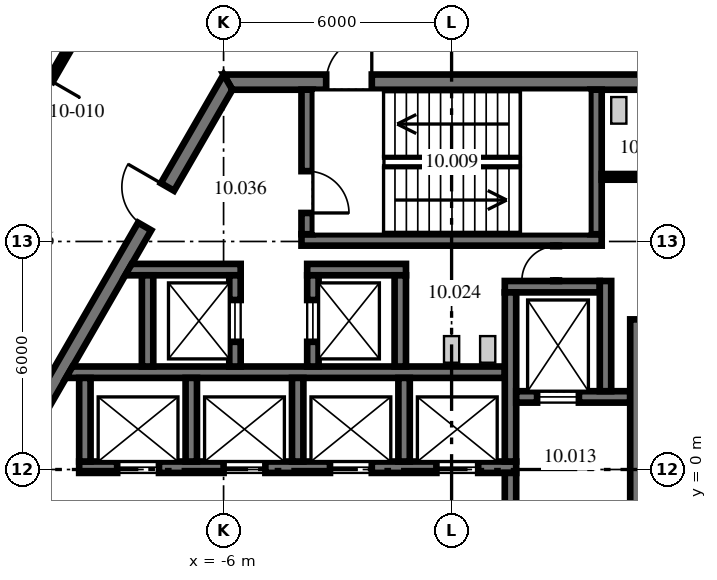
"""IFC4 building model, lengths in metres.
Left out: names, types, materials, properties, quantities, classifications, styles, units other than length and angle.
Written with IfcOpenShell. Run it as: python <this file> out.ifc"""

import sys

from ifc_helpers import new_model, si_unit, direction, frame, frame_2d, origin, place, context, subcontext, project, spatial, polyline, rectangle, outline, extrude, source, transform, mapped, element, fill, save


model = new_model("IFC4")
c1 = context("Model", 3, precision=1e-05, world=origin(), true_north=direction((0.0, 1.0)))
c2 = subcontext(c1, "Body", "Model", "MODEL_VIEW")
j1 = project(units=[si_unit("LENGTHUNIT", "METRE"), si_unit("PLANEANGLEUNIT", "RADIAN")], contexts=[c1])
p1 = place(None, origin())
s1 = spatial("IfcSite", under=j1, at=p1, CompositionType="ELEMENT")
p2 = place(p1, origin())
s2 = spatial("IfcBuilding", under=s1, at=p2, CompositionType="ELEMENT")
p3 = place(p2, frame((0.0, 0.0, 46.1)))
s3 = spatial("IfcBuildingStorey", under=s2, at=p3, CompositionType="ELEMENT", Elevation=46.1)
m1 = source(origin(), c2, "Body", "SweptSolid", [
    extrude(outline(polyline([(-0.115, -0.2), (11.885, -0.2), (11.654, 0.2), (0.115, 0.2), (-0.115, -0.2)])), origin(), (0.0, 0.0, 1.0), 4.1),
])
p4 = place(p3, frame((5.885, 10.192, 0.0), z_axis=(0.0, 0.0, 1.0), x_axis=(-1.0, 0.0, 0.0)))
e1 = element("IfcWall", 1, at=p4, inside=s3, PredefinedType="SHEAR", context=c2, shape_type="MappedRepresentation", body=[
    mapped(m1, transform((0.0, 0.0, 0.0), scale=1.0)),
])
p5 = place(p4, frame((7.985, 0.0, 0.0)))
e2 = element("IfcOpeningElement", 2, at=p5, cuts=e1, PredefinedType="OPENING", context=c2, shape_type="SweptSolid", body=[
    extrude(rectangle(XDim=1.2, YDim=2.1, at=frame_2d((0.6, 1.05))), frame((0.0, 0.21, 0.0), z_axis=(0.0, -1.0, 0.0), x_axis=(1.0, 0.0, 0.0)), (0.0, 0.0, 1.0), 0.42),
])
p6 = place(p3, frame((-5.885, 10.192, 0.0), z_axis=(0.0, 0.0, 1.0), x_axis=(-0.499996592174, -0.866027371285, 0.0)))
e3 = element("IfcWall", 3, at=p6, inside=s3, PredefinedType="SHEAR", context=c2, shape_type="MappedRepresentation", body=[
    mapped(m1, transform((0.0, 0.0, 0.0), scale=1.0)),
])
p7 = place(p6, frame((3.185, 0.0, 0.0)))
e4 = element("IfcOpeningElement", 4, at=p7, cuts=e3, PredefinedType="OPENING", context=c2, shape_type="SweptSolid", body=[
    extrude(rectangle(XDim=1.2, YDim=2.1, at=frame_2d((0.6, 1.05))), frame((0.0, 0.21, 0.0), z_axis=(0.0, -1.0, 0.0), x_axis=(1.0, 0.0, 0.0)), (0.0, 0.0, 1.0), 0.42),
])
p8 = place(p3, frame((-11.769, 0.0, 0.0), z_axis=(0.0, 0.0, 1.0), x_axis=(0.499996592174, -0.866027371285, 0.0)))
e5 = element("IfcWall", 5, at=p8, inside=s3, PredefinedType="SHEAR", context=c2, shape_type="MappedRepresentation", body=[
    mapped(m1, transform((0.0, 0.0, 0.0), scale=1.0)),
])
p9 = place(p8, frame((1.405, 0.0, 0.0)))
e6 = element("IfcOpeningElement", 6, at=p9, cuts=e5, PredefinedType="OPENING", context=c2, shape_type="SweptSolid", body=[
    extrude(rectangle(XDim=1.8, YDim=2.1, at=frame_2d((0.9, 1.05))), frame((0.0, 0.21, 0.0), z_axis=(0.0, -1.0, 0.0), x_axis=(1.0, 0.0, 0.0)), (0.0, 0.0, 1.0), 0.42),
])
p10 = place(p8, frame((7.915, 0.0, 0.0)))
e7 = element("IfcOpeningElement", 7, at=p10, cuts=e5, PredefinedType="OPENING", context=c2, shape_type="SweptSolid", body=[
    extrude(rectangle(XDim=1.2, YDim=2.1, at=frame_2d((0.6, 1.05))), frame((0.0, 0.21, 0.0), z_axis=(0.0, -1.0, 0.0), x_axis=(1.0, 0.0, 0.0)), (0.0, 0.0, 1.0), 0.42),
])
m2 = source(origin(), c2, "Body", "SweptSolid", [
    extrude(rectangle(XDim=11.5, YDim=0.3, at=frame_2d((5.75, 0.0))), origin(), (0.0, 0.0, 1.0), 4.1),
])
p11 = place(p3, frame((-9.8, 0.06, 0.0), z_axis=(0.0, 0.0, 1.0), x_axis=(1.0, 0.0, 0.0)))
e8 = element("IfcWall", 8, at=p11, inside=s3, PredefinedType="SHEAR", context=c2, shape_type="MappedRepresentation", body=[
    mapped(m2, transform((0.0, 0.0, 0.0), scale=1.0)),
])
p12 = place(p11, frame((1.0, 0.0, 0.0)))
e9 = element("IfcOpeningElement", 9, at=p12, cuts=e8, PredefinedType="OPENING", context=c2, shape_type="SweptSolid", body=[
    extrude(rectangle(XDim=1.1, YDim=2.1, at=frame_2d((0.55, 1.05))), frame((0.0, 0.16, 0.0), z_axis=(0.0, -1.0, 0.0), x_axis=(1.0, 0.0, 0.0)), (0.0, 0.0, 1.0), 0.32),
])
p13 = place(p11, frame((3.8, 0.0, 0.0)))
e10 = element("IfcOpeningElement", 10, at=p13, cuts=e8, PredefinedType="OPENING", context=c2, shape_type="SweptSolid", body=[
    extrude(rectangle(XDim=1.1, YDim=2.1, at=frame_2d((0.55, 1.05))), frame((0.0, 0.16, 0.0), z_axis=(0.0, -1.0, 0.0), x_axis=(1.0, 0.0, 0.0)), (0.0, 0.0, 1.0), 0.32),
])
p14 = place(p11, frame((6.6, 0.0, 0.0)))
e11 = element("IfcOpeningElement", 11, at=p14, cuts=e8, PredefinedType="OPENING", context=c2, shape_type="SweptSolid", body=[
    extrude(rectangle(XDim=1.1, YDim=2.1, at=frame_2d((0.55, 1.05))), frame((0.0, 0.16, 0.0), z_axis=(0.0, -1.0, 0.0), x_axis=(1.0, 0.0, 0.0)), (0.0, 0.0, 1.0), 0.32),
])
p15 = place(p11, frame((9.4, 0.0, 0.0)))
e12 = element("IfcOpeningElement", 12, at=p15, cuts=e8, PredefinedType="OPENING", context=c2, shape_type="SweptSolid", body=[
    extrude(rectangle(XDim=1.1, YDim=2.1, at=frame_2d((0.55, 1.05))), frame((0.0, 0.16, 0.0), z_axis=(0.0, -1.0, 0.0), x_axis=(1.0, 0.0, 0.0)), (0.0, 0.0, 1.0), 0.32),
])
m3 = source(origin(), c2, "Body", "SweptSolid", [
    extrude(outline(polyline([(11.2, -0.15), (-0.349, -0.15), (-0.176, 0.15), (11.2, 0.15), (11.2, -0.15)])), origin(), (0.0, 0.0, 1.0), 4.1),
])
p16 = place(p3, frame((-9.8, 2.56, 0.0), z_axis=(0.0, 0.0, 1.0), x_axis=(1.0, 0.0, 0.0)))
e13 = element("IfcWall", 13, at=p16, inside=s3, PredefinedType="SHEAR", context=c2, shape_type="MappedRepresentation", body=[
    mapped(m3, transform((0.0, 0.0, 0.0), scale=1.0)),
])
m4 = source(origin(), c2, "Body", "SweptSolid", [
    extrude(rectangle(XDim=2.5, YDim=0.3, at=frame_2d((1.25, 0.0))), origin(), (0.0, 0.0, 1.0), 4.1),
])
p17 = place(p3, frame((1.4, 4.81, 0.0), z_axis=(0.0, 0.0, 1.0), x_axis=(1.0, 0.0, 0.0)))
e14 = element("IfcWall", 14, at=p17, inside=s3, PredefinedType="SHEAR", context=c2, shape_type="MappedRepresentation", body=[
    mapped(m4, transform((0.0, 0.0, 0.0), scale=1.0)),
])
m5 = source(origin(), c2, "Body", "SweptSolid", [
    extrude(rectangle(XDim=4.45, YDim=0.3, at=frame_2d((2.225, 0.0))), origin(), (0.0, 0.0, 1.0), 4.1),
])
p18 = place(p3, frame((1.55, 0.21, 0.0), z_axis=(0.0, 0.0, 1.0), x_axis=(0.0, 1.0, 0.0)))
e15 = element("IfcWall", 15, at=p18, inside=s3, PredefinedType="SHEAR", context=c2, shape_type="MappedRepresentation", body=[
    mapped(m5, transform((0.0, 0.0, 0.0), scale=1.0)),
])
m6 = source(origin(), c2, "Body", "SweptSolid", [
    extrude(rectangle(XDim=3.0, YDim=0.3, at=frame_2d((1.5, 0.0))), origin(), (0.0, 0.0, 1.0), 4.1),
])
p19 = place(p3, frame((1.7, 1.91, 0.0), z_axis=(0.0, 0.0, 1.0), x_axis=(1.0, 0.0, 0.0)))
e16 = element("IfcWall", 16, at=p19, inside=s3, PredefinedType="SHEAR", context=c2, shape_type="MappedRepresentation", body=[
    mapped(m6, transform((0.0, 0.0, 0.0), scale=1.0)),
])
p20 = place(p19, frame((0.55, 0.0, 0.0)))
e17 = element("IfcOpeningElement", 17, at=p20, cuts=e16, PredefinedType="OPENING", context=c2, shape_type="SweptSolid", body=[
    extrude(rectangle(XDim=1.1, YDim=2.1, at=frame_2d((0.55, 1.05))), frame((0.0, 0.16, 0.0), z_axis=(0.0, -1.0, 0.0), x_axis=(1.0, 0.0, 0.0)), (0.0, 0.0, 1.0), 0.32),
])
m7 = source(origin(), c2, "Body", "SweptSolid", [
    extrude(rectangle(XDim=2.9, YDim=0.3, at=frame_2d((1.45, 0.0))), origin(), (0.0, 0.0, 1.0), 4.1),
])
p21 = place(p3, frame((4.05, 2.06, 0.0), z_axis=(0.0, 0.0, 1.0), x_axis=(0.0, 1.0, 0.0)))
e18 = element("IfcWall", 18, at=p21, inside=s3, PredefinedType="SHEAR", context=c2, shape_type="MappedRepresentation", body=[
    mapped(m7, transform((0.0, 0.0, 0.0), scale=1.0)),
])
m8 = source(origin(), c2, "Body", "SweptSolid", [
    extrude(rectangle(XDim=2.2, YDim=0.3, at=frame_2d((1.1, 0.0))), origin(), (0.0, 0.0, 1.0), 4.1),
])
p22 = place(p3, frame((-9.65, 0.21, 0.0), z_axis=(0.0, 0.0, 1.0), x_axis=(0.0, 1.0, 0.0)))
e19 = element("IfcWall", 19, at=p22, inside=s3, PredefinedType="SHEAR", context=c2, shape_type="MappedRepresentation", body=[
    mapped(m8, transform((0.0, 0.0, 0.0), scale=1.0)),
])
p23 = place(p3, frame((1.55, -3.09, 0.0), z_axis=(0.0, 0.0, 1.0), x_axis=(0.0, 1.0, 0.0)))
e20 = element("IfcWall", 20, at=p23, inside=s3, PredefinedType="SHEAR", context=c2, shape_type="MappedRepresentation", body=[
    mapped(m6, transform((0.0, 0.0, 0.0), scale=1.0)),
])
p24 = place(p23, frame((0.9, 0.0, 0.0)))
e21 = element("IfcOpeningElement", 21, at=p24, cuts=e20, PredefinedType="OPENING", context=c2, shape_type="SweptSolid", body=[
    extrude(rectangle(XDim=1.2, YDim=2.1, at=frame_2d((0.6, 1.05))), frame((0.0, 0.16, 0.0), z_axis=(0.0, -1.0, 0.0), x_axis=(1.0, 0.0, 0.0)), (0.0, 0.0, 1.0), 0.32),
])
m9 = source(origin(), c2, "Body", "SweptSolid", [
    extrude(outline(polyline([(-0.15, -0.15), (9.99, -0.15), (9.99, 0.15), (0.15, 0.15), (-0.15, -0.15)])), origin(), (0.0, 0.0, 1.0), 4.1),
])
p25 = place(p3, frame((4.85, -6.04, 0.0), z_axis=(0.0, 0.0, 1.0), x_axis=(0.0, 1.0, 0.0)))
e22 = element("IfcWall", 22, at=p25, inside=s3, PredefinedType="SHEAR", context=c2, shape_type="MappedRepresentation", body=[
    mapped(m9, transform((0.0, 0.0, 0.0), scale=1.0)),
])
p26 = place(p25, frame((3.19, 0.0, 0.0)))
e23 = element("IfcOpeningElement", 23, at=p26, cuts=e22, PredefinedType="OPENING", context=c2, shape_type="SweptSolid", body=[
    extrude(rectangle(XDim=1.1, YDim=2.1, at=frame_2d((0.55, 1.05))), frame((0.0, 0.16, 0.0), z_axis=(0.0, -1.0, 0.0), x_axis=(1.0, 0.0, 0.0)), (0.0, 0.0, 1.0), 0.32),
])
m10 = source(origin(), c2, "Body", "SweptSolid", [
    extrude(rectangle(XDim=7.9, YDim=0.3, at=frame_2d((3.95, 0.0))), origin(), (0.0, 0.0, 1.0), 4.1),
])
p27 = place(p3, frame((-3.95, 6.04, 0.0), z_axis=(0.0, 0.0, 1.0), x_axis=(1.0, 0.0, 0.0)))
e24 = element("IfcWall", 24, at=p27, inside=s3, PredefinedType="SHEAR", context=c2, shape_type="MappedRepresentation", body=[
    mapped(m10, transform((0.0, 0.0, 0.0), scale=1.0)),
])
m11 = source(origin(), c2, "Body", "SweptSolid", [
    extrude(outline(polyline([(0.0, -0.15), (0.0, 0.15), (3.804, 0.15), (3.804, -0.15), (0.0, -0.15)])), origin(), (0.0, 0.0, 1.0), 4.1),
])
p28 = place(p3, frame((-3.8, 6.19, 0.0), z_axis=(0.0, 0.0, 1.0), x_axis=(0.0, 1.0, 0.0)))
e25 = element("IfcWall", 25, at=p28, inside=s3, PredefinedType="SHEAR", context=c2, shape_type="MappedRepresentation", body=[
    mapped(m11, transform((0.0, 0.0, 0.0), scale=1.0)),
])
p29 = place(p28, frame((0.56, 0.0, 0.0)))
e26 = element("IfcOpeningElement", 26, at=p29, cuts=e25, PredefinedType="OPENING", context=c2, shape_type="SweptSolid", body=[
    extrude(rectangle(XDim=1.1, YDim=2.1, at=frame_2d((0.55, 1.05))), frame((0.0, 0.16, 0.0), z_axis=(0.0, -1.0, 0.0), x_axis=(1.0, 0.0, 0.0)), (0.0, 0.0, 1.0), 0.32),
])
p30 = place(p3, frame((3.8, 6.19, 0.0), z_axis=(0.0, 0.0, 1.0), x_axis=(0.0, 1.0, 0.0)))
e27 = element("IfcWall", 27, at=p30, inside=s3, PredefinedType="SHEAR", context=c2, shape_type="MappedRepresentation", body=[
    mapped(m11, transform((0.0, 0.0, 0.0), scale=1.0)),
])
m12 = source(origin(), c2, "Body", "SweptSolid", [
    extrude(outline(polyline([(2.6, -0.15), (-0.44, -0.15), (-0.267, 0.15), (2.6, 0.15), (2.6, -0.15)])), origin(), (0.0, 0.0, 1.0), 4.1),
])
p31 = place(p3, frame((-8.15, 5.26, 0.0), z_axis=(0.0, 0.0, 1.0), x_axis=(1.0, 0.0, 0.0)))
e28 = element("IfcWall", 28, at=p31, inside=s3, PredefinedType="SHEAR", context=c2, shape_type="MappedRepresentation", body=[
    mapped(m12, transform((0.0, 0.0, 0.0), scale=1.0)),
])
m13 = source(origin(), c2, "Body", "SweptSolid", [
    extrude(rectangle(XDim=2.4, YDim=0.3, at=frame_2d((1.2, 0.0))), origin(), (0.0, 0.0, 1.0), 4.1),
])
p32 = place(p3, frame((-8.0, 2.71, 0.0), z_axis=(0.0, 0.0, 1.0), x_axis=(0.0, 1.0, 0.0)))
e29 = element("IfcWall", 29, at=p32, inside=s3, PredefinedType="SHEAR", context=c2, shape_type="MappedRepresentation", body=[
    mapped(m13, transform((0.0, 0.0, 0.0), scale=1.0)),
])
p33 = place(p3, frame((-5.7, 2.71, 0.0), z_axis=(0.0, 0.0, 1.0), x_axis=(0.0, 1.0, 0.0)))
e30 = element("IfcWall", 30, at=p33, inside=s3, PredefinedType="SHEAR", context=c2, shape_type="MappedRepresentation", body=[
    mapped(m13, transform((0.0, 0.0, 0.0), scale=1.0)),
])
p34 = place(p33, frame((0.65, 0.0, 0.0)))
e31 = element("IfcOpeningElement", 31, at=p34, cuts=e30, PredefinedType="OPENING", context=c2, shape_type="SweptSolid", body=[
    extrude(rectangle(XDim=1.1, YDim=2.1, at=frame_2d((0.55, 1.05))), frame((0.0, 0.16, 0.0), z_axis=(0.0, -1.0, 0.0), x_axis=(1.0, 0.0, 0.0)), (0.0, 0.0, 1.0), 0.32),
])
m14 = source(origin(), c2, "Body", "SweptSolid", [
    extrude(rectangle(XDim=2.6, YDim=0.3, at=frame_2d((1.3, 0.0))), origin(), (0.0, 0.0, 1.0), 4.1),
])
p35 = place(p3, frame((-3.8, 5.26, 0.0), z_axis=(0.0, 0.0, 1.0), x_axis=(1.0, 0.0, 0.0)))
e32 = element("IfcWall", 32, at=p35, inside=s3, PredefinedType="SHEAR", context=c2, shape_type="MappedRepresentation", body=[
    mapped(m14, transform((0.0, 0.0, 0.0), scale=1.0)),
])
p36 = place(p3, frame((-3.65, 2.71, 0.0), z_axis=(0.0, 0.0, 1.0), x_axis=(0.0, 1.0, 0.0)))
e33 = element("IfcWall", 33, at=p36, inside=s3, PredefinedType="SHEAR", context=c2, shape_type="MappedRepresentation", body=[
    mapped(m13, transform((0.0, 0.0, 0.0), scale=1.0)),
])
p37 = place(p36, frame((0.65, 0.0, 0.0)))
e34 = element("IfcOpeningElement", 34, at=p37, cuts=e33, PredefinedType="OPENING", context=c2, shape_type="SweptSolid", body=[
    extrude(rectangle(XDim=1.1, YDim=2.1, at=frame_2d((0.55, 1.05))), frame((0.0, 0.16, 0.0), z_axis=(0.0, -1.0, 0.0), x_axis=(1.0, 0.0, 0.0)), (0.0, 0.0, 1.0), 0.32),
])
p38 = place(p3, frame((-1.35, 2.71, 0.0), z_axis=(0.0, 0.0, 1.0), x_axis=(0.0, 1.0, 0.0)))
e35 = element("IfcWall", 35, at=p38, inside=s3, PredefinedType="SHEAR", context=c2, shape_type="MappedRepresentation", body=[
    mapped(m13, transform((0.0, 0.0, 0.0), scale=1.0)),
])
for number, where, z_axis, x_axis in (
    (36, (-6.85, 0.21, 0.0), (0.0, 0.0, 1.0), (0.0, 1.0, 0.0)),
    (37, (-4.05, 0.21, 0.0), (0.0, 0.0, 1.0), (0.0, 1.0, 0.0)),
    (38, (-1.25, 0.21, 0.0), (0.0, 0.0, 1.0), (0.0, 1.0, 0.0)),
):
    element("IfcWall", number, at=place(p3, frame(where, z_axis=z_axis, x_axis=x_axis)), inside=s3, PredefinedType="SHEAR", context=c2, shape_type="MappedRepresentation", body=[
        mapped(m8, transform((0.0, 0.0, 0.0), scale=1.0)),
    ])
m15 = source(origin(), c2, "Body", "SweptSolid", [
    extrude(outline(polyline([(0.0, -0.075), (0.0, 0.075), (3.102, 0.075), (3.188, -0.075), (0.0, -0.075)])), origin(), (0.0, 0.0, 1.0), 4.1),
])
p39 = place(p3, frame((3.95, 7.7, 0.0), z_axis=(0.0, 0.0, 1.0), x_axis=(1.0, 0.0, 0.0)))
e39 = element("IfcWall", 39, at=p39, inside=s3, PredefinedType="PARTITIONING", context=c2, shape_type="MappedRepresentation", body=[
    mapped(m15, transform((0.0, 0.0, 0.0), scale=1.0)),
])
p40 = place(p39, frame((1.6, 0.0, 0.0)))
e40 = element("IfcOpeningElement", 40, at=p40, cuts=e39, PredefinedType="OPENING", context=c2, shape_type="SweptSolid", body=[
    extrude(rectangle(XDim=0.9, YDim=2.1, at=frame_2d((0.45, 1.05))), frame((0.0, 0.085, 0.0), z_axis=(0.0, -1.0, 0.0), x_axis=(1.0, 0.0, 0.0)), (0.0, 0.0, 1.0), 0.17),
])
m16 = source(origin(), c2, "Body", "SweptSolid", [
    extrude(rectangle(XDim=0.93, YDim=0.15, at=frame_2d((0.465, 0.0))), origin(), (0.0, 0.0, 1.0), 4.1),
])
p41 = place(p3, frame((2.75, 4.96, 0.0), z_axis=(0.0, 0.0, 1.0), x_axis=(0.0, 1.0, 0.0)))
e41 = element("IfcWall", 41, at=p41, inside=s3, PredefinedType="PARTITIONING", context=c2, shape_type="MappedRepresentation", body=[
    mapped(m16, transform((0.0, 0.0, 0.0), scale=1.0)),
])
p42 = place(p41, frame((0.015, 0.0, 0.0)))
e42 = element("IfcOpeningElement", 42, at=p42, cuts=e41, PredefinedType="OPENING", context=c2, shape_type="SweptSolid", body=[
    extrude(rectangle(XDim=0.9, YDim=2.1, at=frame_2d((0.45, 1.05))), frame((0.0, 0.085, 0.0), z_axis=(0.0, -1.0, 0.0), x_axis=(1.0, 0.0, 0.0)), (0.0, 0.0, 1.0), 0.17),
])
p43 = place(p3, frame((-13.355, 5.398, 0.0), z_axis=(0.0, 0.0, 1.0), x_axis=(0.499984682238, 0.866034247318, 0.0)))
e43 = element("IfcWall", 43, at=p43, inside=s3, PredefinedType="PARTITIONING", context=c2, shape_type="SweptSolid", body=[
    extrude(rectangle(XDim=10.235, YDim=0.15, at=frame_2d((5.118, 0.0))), origin(), (0.0, 0.0, 1.0), 4.1),
])
p44 = place(p43, frame((4.688, 0.0, 0.0)))
e44 = element("IfcOpeningElement", 44, at=p44, cuts=e43, PredefinedType="OPENING", context=c2, shape_type="SweptSolid", body=[
    extrude(rectangle(XDim=0.9, YDim=2.1, at=frame_2d((0.45, 1.05))), frame((0.0, 0.085, 0.0), z_axis=(0.0, -1.0, 0.0), x_axis=(1.0, 0.0, 0.0)), (0.0, 0.0, 1.0), 0.17),
])
p45 = place(p3, frame((-14.708, 7.655, 0.0), z_axis=(0.0, 0.0, 1.0), x_axis=(0.500000437373, 0.866025151267, 0.0)))
e45 = element("IfcWall", 45, at=p45, inside=s3, PredefinedType="PARTITIONING", context=c2, shape_type="SweptSolid", body=[
    extrude(rectangle(XDim=10.289, YDim=0.15, at=frame_2d((5.144, 0.0))), origin(), (0.0, 0.0, 1.0), 4.1),
])
p46 = place(p45, frame((8.338, 0.0, 0.0)))
e46 = element("IfcOpeningElement", 46, at=p46, cuts=e45, PredefinedType="OPENING", context=c2, shape_type="SweptSolid", body=[
    extrude(rectangle(XDim=0.9, YDim=2.1, at=frame_2d((0.45, 1.05))), frame((0.0, 0.085, 0.0), z_axis=(0.0, -1.0, 0.0), x_axis=(1.0, 0.0, 0.0)), (0.0, 0.0, 1.0), 0.17),
])
p47 = place(p45, frame((4.531, 0.0, 0.0)))
e47 = element("IfcOpeningElement", 47, at=p47, cuts=e45, PredefinedType="OPENING", context=c2, shape_type="SweptSolid", body=[
    extrude(rectangle(XDim=0.9, YDim=2.1, at=frame_2d((0.45, 1.05))), frame((0.0, 0.085, 0.0), z_axis=(0.0, -1.0, 0.0), x_axis=(1.0, 0.0, 0.0)), (0.0, 0.0, 1.0), 0.17),
])
p48 = place(p45, frame((0.921, 0.0, 0.0)))
e48 = element("IfcOpeningElement", 48, at=p48, cuts=e45, PredefinedType="OPENING", context=c2, shape_type="SweptSolid", body=[
    extrude(rectangle(XDim=0.9, YDim=2.1, at=frame_2d((0.45, 1.05))), frame((0.0, 0.085, 0.0), z_axis=(0.0, -1.0, 0.0), x_axis=(1.0, 0.0, 0.0)), (0.0, 0.0, 1.0), 0.17),
])
p49 = place(p5, frame((1.2, 0.0, 0.0), z_axis=(0.0, 0.0, 1.0), x_axis=(-1.0, 0.0, 0.0)))
e49 = element("IfcDoor", 49, at=p49, inside=s3, OperationType="SINGLE_SWING_RIGHT", PredefinedType="DOOR", context=c2, shape_type="SweptSolid", body=[
    extrude(rectangle(XDim=1.2, YDim=2.1, at=frame_2d((0.6, 1.05))), frame((0.0, 0.025, 0.0), z_axis=(0.0, -1.0, 0.0), x_axis=(1.0, 0.0, 0.0)), (0.0, 0.0, 1.0), 0.05),
])
fill(e2, e49)
p50 = place(p7, frame((1.2, 0.0, 0.0), z_axis=(0.0, 0.0, 1.0), x_axis=(-1.0, 0.0, 0.0)))
e50 = element("IfcDoor", 50, at=p50, inside=s3, OperationType="SINGLE_SWING_RIGHT", PredefinedType="DOOR", context=c2, shape_type="SweptSolid", body=[
    extrude(rectangle(XDim=1.2, YDim=2.1, at=frame_2d((0.6, 1.05))), frame((0.0, 0.025, 0.0), z_axis=(0.0, -1.0, 0.0), x_axis=(1.0, 0.0, 0.0)), (0.0, 0.0, 1.0), 0.05),
])
fill(e4, e50)
p51 = place(p29, frame((1.1, 0.0, 0.0), z_axis=(0.0, 0.0, 1.0), x_axis=(-1.0, 0.0, 0.0)))
e51 = element("IfcDoor", 51, at=p51, inside=s3, OperationType="SINGLE_SWING_RIGHT", PredefinedType="DOOR", context=c2, shape_type="SweptSolid", body=[
    extrude(rectangle(XDim=1.1, YDim=2.1, at=frame_2d((0.55, 1.05))), frame((0.0, 0.025, 0.0), z_axis=(0.0, -1.0, 0.0), x_axis=(1.0, 0.0, 0.0)), (0.0, 0.0, 1.0), 0.05),
])
fill(e26, e51)
p52 = place(p42, origin())
e52 = element("IfcDoor", 52, at=p52, inside=s3, OperationType="SINGLE_SWING_LEFT", PredefinedType="DOOR", context=c2, shape_type="SweptSolid", body=[
    extrude(rectangle(XDim=0.9, YDim=2.1, at=frame_2d((0.45, 1.05))), frame((0.0, 0.025, 0.0), z_axis=(0.0, -1.0, 0.0), x_axis=(1.0, 0.0, 0.0)), (0.0, 0.0, 1.0), 0.05),
])
fill(e42, e52)
p53 = place(p12, origin())
e53 = element("IfcDoor", 53, at=p53, inside=s3, OperationType="DOUBLE_DOOR_SLIDING", PredefinedType="DOOR", context=c2, shape_type="SweptSolid", body=[
    extrude(rectangle(XDim=1.1, YDim=2.1, at=frame_2d((0.55, 1.05))), frame((0.0, 0.025, 0.0), z_axis=(0.0, -1.0, 0.0), x_axis=(1.0, 0.0, 0.0)), (0.0, 0.0, 1.0), 0.05),
])
fill(e9, e53)
p54 = place(p13, origin())
e54 = element("IfcDoor", 54, at=p54, inside=s3, OperationType="DOUBLE_DOOR_SLIDING", PredefinedType="DOOR", context=c2, shape_type="SweptSolid", body=[
    extrude(rectangle(XDim=1.1, YDim=2.1, at=frame_2d((0.55, 1.05))), frame((0.0, 0.025, 0.0), z_axis=(0.0, -1.0, 0.0), x_axis=(1.0, 0.0, 0.0)), (0.0, 0.0, 1.0), 0.05),
])
fill(e10, e54)
p55 = place(p14, origin())
e55 = element("IfcDoor", 55, at=p55, inside=s3, OperationType="DOUBLE_DOOR_SLIDING", PredefinedType="DOOR", context=c2, shape_type="SweptSolid", body=[
    extrude(rectangle(XDim=1.1, YDim=2.1, at=frame_2d((0.55, 1.05))), frame((0.0, 0.025, 0.0), z_axis=(0.0, -1.0, 0.0), x_axis=(1.0, 0.0, 0.0)), (0.0, 0.0, 1.0), 0.05),
])
fill(e11, e55)
p56 = place(p15, origin())
e56 = element("IfcDoor", 56, at=p56, inside=s3, OperationType="DOUBLE_DOOR_SLIDING", PredefinedType="DOOR", context=c2, shape_type="SweptSolid", body=[
    extrude(rectangle(XDim=1.1, YDim=2.1, at=frame_2d((0.55, 1.05))), frame((0.0, 0.025, 0.0), z_axis=(0.0, -1.0, 0.0), x_axis=(1.0, 0.0, 0.0)), (0.0, 0.0, 1.0), 0.05),
])
fill(e12, e56)
p57 = place(p20, origin())
e57 = element("IfcDoor", 57, at=p57, inside=s3, OperationType="DOUBLE_DOOR_SLIDING", PredefinedType="DOOR", context=c2, shape_type="SweptSolid", body=[
    extrude(rectangle(XDim=1.1, YDim=2.1, at=frame_2d((0.55, 1.05))), frame((0.0, 0.025, 0.0), z_axis=(0.0, -1.0, 0.0), x_axis=(1.0, 0.0, 0.0)), (0.0, 0.0, 1.0), 0.05),
])
fill(e17, e57)
p58 = place(p34, origin())
e58 = element("IfcDoor", 58, at=p58, inside=s3, OperationType="DOUBLE_DOOR_SLIDING", PredefinedType="DOOR", context=c2, shape_type="SweptSolid", body=[
    extrude(rectangle(XDim=1.1, YDim=2.1, at=frame_2d((0.55, 1.05))), frame((0.0, 0.025, 0.0), z_axis=(0.0, -1.0, 0.0), x_axis=(1.0, 0.0, 0.0)), (0.0, 0.0, 1.0), 0.05),
])
fill(e31, e58)
p59 = place(p37, origin())
e59 = element("IfcDoor", 59, at=p59, inside=s3, OperationType="DOUBLE_DOOR_SLIDING", PredefinedType="DOOR", context=c2, shape_type="SweptSolid", body=[
    extrude(rectangle(XDim=1.1, YDim=2.1, at=frame_2d((0.55, 1.05))), frame((0.0, 0.025, 0.0), z_axis=(0.0, -1.0, 0.0), x_axis=(1.0, 0.0, 0.0)), (0.0, 0.0, 1.0), 0.05),
])
fill(e34, e59)
save(model, sys.argv[1])
